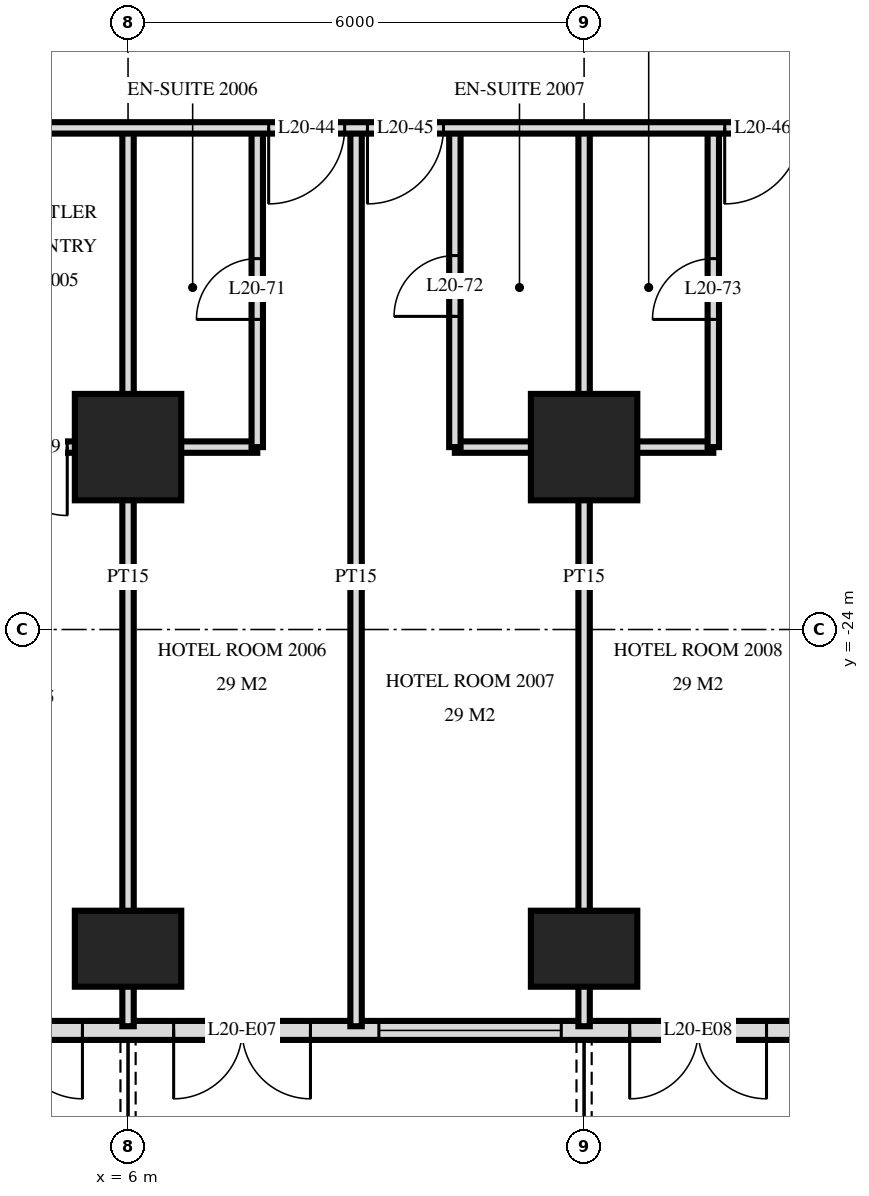
"""IFC4 building model, lengths in metres.
Left out: names, types, materials, properties, quantities, classifications, styles, units other than length and angle.
Written with IfcOpenShell. Run it as: python <this file> out.ifc"""

import sys

from ifc_helpers import new_model, si_unit, direction, frame, frame_2d, origin, origin_2d, place, context, subcontext, project, spatial, rectangle, extrude, element, fill, save


model = new_model("IFC4")
c1 = context("Model", 3, precision=1e-05, world=origin(), true_north=direction((0.0, 1.0)))
c2 = subcontext(c1, "Body", "Model", "MODEL_VIEW")
j1 = project(units=[si_unit("LENGTHUNIT", "METRE"), si_unit("PLANEANGLEUNIT", "RADIAN")], contexts=[c1])
p1 = place(None, origin())
s1 = spatial("IfcSite", under=j1, at=p1, CompositionType="ELEMENT")
p2 = place(p1, origin())
s2 = spatial("IfcBuilding", under=s1, at=p2, CompositionType="ELEMENT")
p3 = place(p2, frame((0.0, 0.0, 81.6)))
s3 = spatial("IfcBuildingStorey", under=s2, at=p3, CompositionType="ELEMENT", Elevation=81.6)
p4 = place(p3, frame((6.0, -28.2, 0.0), z_axis=(0.0, 0.0, 1.0), x_axis=(1.0, 0.0, 0.0)))
e1 = element("IfcColumn", 1, at=p4, inside=s3, PredefinedType="COLUMN", context=c2, shape_type="SweptSolid", body=[
    extrude(rectangle(XDim=1.4, YDim=1.0, at=origin_2d()), origin(), (0.0, 0.0, 1.0), 3.6),
])
p5 = place(p3, frame((6.0, -21.6, 0.0), z_axis=(0.0, 0.0, 1.0), x_axis=(1.0, 0.0, 0.0)))
e2 = element("IfcColumn", 2, at=p5, inside=s3, PredefinedType="COLUMN", context=c2, shape_type="SweptSolid", body=[
    extrude(rectangle(XDim=1.4, YDim=1.4, at=origin_2d()), origin(), (0.0, 0.0, 1.0), 3.6),
])
p6 = place(p3, frame((12.0, -28.2, 0.0), z_axis=(0.0, 0.0, 1.0), x_axis=(1.0, 0.0, 0.0)))
e3 = element("IfcColumn", 3, at=p6, inside=s3, PredefinedType="COLUMN", context=c2, shape_type="SweptSolid", body=[
    extrude(rectangle(XDim=1.4, YDim=1.0, at=origin_2d()), origin(), (0.0, 0.0, 1.0), 3.6),
])
p7 = place(p3, frame((12.0, -21.6, 0.0), z_axis=(0.0, 0.0, 1.0), x_axis=(1.0, 0.0, 0.0)))
e4 = element("IfcColumn", 4, at=p7, inside=s3, PredefinedType="COLUMN", context=c2, shape_type="SweptSolid", body=[
    extrude(rectangle(XDim=1.4, YDim=1.4, at=origin_2d()), origin(), (0.0, 0.0, 1.0), 3.6),
])
p8 = place(p3, frame((-28.775, -29.275, 0.0), z_axis=(0.0, 0.0, 1.0), x_axis=(1.0, 0.0, 0.0)))
e5 = element("IfcWall", 5, at=p8, inside=s3, PredefinedType="SOLIDWALL", context=c2, shape_type="SweptSolid", body=[
    extrude(rectangle(XDim=57.551, YDim=0.25, at=frame_2d((28.775, 0.0))), origin(), (0.0, 0.0, 1.0), 3.32),
])
p9 = place(p8, frame((0.575, 0.0, 0.0)))
e6 = element("IfcOpeningElement", 6, at=p9, cuts=e5, PredefinedType="OPENING", context=c2, shape_type="SweptSolid", body=[
    extrude(rectangle(XDim=1.8, YDim=2.4, at=frame_2d((0.9, 1.2))), frame((0.0, 0.135, 0.0), z_axis=(0.0, -1.0, 0.0), x_axis=(1.0, 0.0, 0.0)), (0.0, 0.0, 1.0), 0.27),
])
p10 = place(p8, frame((5.375, 0.0, 0.0)))
e7 = element("IfcOpeningElement", 7, at=p10, cuts=e5, PredefinedType="OPENING", context=c2, shape_type="SweptSolid", body=[
    extrude(rectangle(XDim=1.8, YDim=2.4, at=frame_2d((0.9, 1.2))), frame((0.0, 0.135, 0.0), z_axis=(0.0, -1.0, 0.0), x_axis=(1.0, 0.0, 0.0)), (0.0, 0.0, 1.0), 0.27),
])
p11 = place(p8, frame((8.075, 0.0, 0.3)))
e8 = element("IfcOpeningElement", 8, at=p11, cuts=e5, PredefinedType="OPENING", context=c2, shape_type="SweptSolid", body=[
    extrude(rectangle(XDim=2.4, YDim=2.1, at=frame_2d((1.2, 1.05))), frame((0.0, 0.135, 0.0), z_axis=(0.0, -1.0, 0.0), x_axis=(1.0, 0.0, 0.0)), (0.0, 0.0, 1.0), 0.27),
])
p12 = place(p8, frame((12.875, 0.0, 0.0)))
e9 = element("IfcOpeningElement", 9, at=p12, cuts=e5, PredefinedType="OPENING", context=c2, shape_type="SweptSolid", body=[
    extrude(rectangle(XDim=1.8, YDim=2.4, at=frame_2d((0.9, 1.2))), frame((0.0, 0.135, 0.0), z_axis=(0.0, -1.0, 0.0), x_axis=(1.0, 0.0, 0.0)), (0.0, 0.0, 1.0), 0.27),
])
p13 = place(p8, frame((17.375, 0.0, 0.0)))
e10 = element("IfcOpeningElement", 10, at=p13, cuts=e5, PredefinedType="OPENING", context=c2, shape_type="SweptSolid", body=[
    extrude(rectangle(XDim=1.8, YDim=2.4, at=frame_2d((0.9, 1.2))), frame((0.0, 0.135, 0.0), z_axis=(0.0, -1.0, 0.0), x_axis=(1.0, 0.0, 0.0)), (0.0, 0.0, 1.0), 0.27),
])
p14 = place(p8, frame((20.075, 0.0, 0.3)))
e11 = element("IfcOpeningElement", 11, at=p14, cuts=e5, PredefinedType="OPENING", context=c2, shape_type="SweptSolid", body=[
    extrude(rectangle(XDim=2.4, YDim=2.1, at=frame_2d((1.2, 1.05))), frame((0.0, 0.135, 0.0), z_axis=(0.0, -1.0, 0.0), x_axis=(1.0, 0.0, 0.0)), (0.0, 0.0, 1.0), 0.27),
])
p15 = place(p8, frame((23.075, 0.0, 0.3)))
e12 = element("IfcOpeningElement", 12, at=p15, cuts=e5, PredefinedType="OPENING", context=c2, shape_type="SweptSolid", body=[
    extrude(rectangle(XDim=2.4, YDim=2.1, at=frame_2d((1.2, 1.05))), frame((0.0, 0.135, 0.0), z_axis=(0.0, -1.0, 0.0), x_axis=(1.0, 0.0, 0.0)), (0.0, 0.0, 1.0), 0.27),
])
p16 = place(p8, frame((26.375, 0.0, 0.0)))
e13 = element("IfcOpeningElement", 13, at=p16, cuts=e5, PredefinedType="OPENING", context=c2, shape_type="SweptSolid", body=[
    extrude(rectangle(XDim=1.8, YDim=2.4, at=frame_2d((0.9, 1.2))), frame((0.0, 0.135, 0.0), z_axis=(0.0, -1.0, 0.0), x_axis=(1.0, 0.0, 0.0)), (0.0, 0.0, 1.0), 0.27),
])
p17 = place(p8, frame((29.075, 0.0, 0.3)))
e14 = element("IfcOpeningElement", 14, at=p17, cuts=e5, PredefinedType="OPENING", context=c2, shape_type="SweptSolid", body=[
    extrude(rectangle(XDim=2.4, YDim=2.1, at=frame_2d((1.2, 1.05))), frame((0.0, 0.135, 0.0), z_axis=(0.0, -1.0, 0.0), x_axis=(1.0, 0.0, 0.0)), (0.0, 0.0, 1.0), 0.27),
])
p18 = place(p8, frame((32.375, 0.0, 0.0)))
e15 = element("IfcOpeningElement", 15, at=p18, cuts=e5, PredefinedType="OPENING", context=c2, shape_type="SweptSolid", body=[
    extrude(rectangle(XDim=1.8, YDim=2.4, at=frame_2d((0.9, 1.2))), frame((0.0, 0.135, 0.0), z_axis=(0.0, -1.0, 0.0), x_axis=(1.0, 0.0, 0.0)), (0.0, 0.0, 1.0), 0.27),
])
p19 = place(p8, frame((35.375, 0.0, 0.0)))
e16 = element("IfcOpeningElement", 16, at=p19, cuts=e5, PredefinedType="OPENING", context=c2, shape_type="SweptSolid", body=[
    extrude(rectangle(XDim=1.8, YDim=2.4, at=frame_2d((0.9, 1.2))), frame((0.0, 0.135, 0.0), z_axis=(0.0, -1.0, 0.0), x_axis=(1.0, 0.0, 0.0)), (0.0, 0.0, 1.0), 0.27),
])
p20 = place(p8, frame((38.075, 0.0, 0.3)))
e17 = element("IfcOpeningElement", 17, at=p20, cuts=e5, PredefinedType="OPENING", context=c2, shape_type="SweptSolid", body=[
    extrude(rectangle(XDim=2.4, YDim=2.1, at=frame_2d((1.2, 1.05))), frame((0.0, 0.135, 0.0), z_axis=(0.0, -1.0, 0.0), x_axis=(1.0, 0.0, 0.0)), (0.0, 0.0, 1.0), 0.27),
])
p21 = place(p8, frame((41.375, 0.0, 0.0)))
e18 = element("IfcOpeningElement", 18, at=p21, cuts=e5, PredefinedType="OPENING", context=c2, shape_type="SweptSolid", body=[
    extrude(rectangle(XDim=1.8, YDim=2.4, at=frame_2d((0.9, 1.2))), frame((0.0, 0.135, 0.0), z_axis=(0.0, -1.0, 0.0), x_axis=(1.0, 0.0, 0.0)), (0.0, 0.0, 1.0), 0.27),
])
p22 = place(p8, frame((44.075, 0.0, 0.3)))
e19 = element("IfcOpeningElement", 19, at=p22, cuts=e5, PredefinedType="OPENING", context=c2, shape_type="SweptSolid", body=[
    extrude(rectangle(XDim=2.4, YDim=2.1, at=frame_2d((1.2, 1.05))), frame((0.0, 0.135, 0.0), z_axis=(0.0, -1.0, 0.0), x_axis=(1.0, 0.0, 0.0)), (0.0, 0.0, 1.0), 0.27),
])
p23 = place(p8, frame((47.075, 0.0, 0.3)))
e20 = element("IfcOpeningElement", 20, at=p23, cuts=e5, PredefinedType="OPENING", context=c2, shape_type="SweptSolid", body=[
    extrude(rectangle(XDim=2.4, YDim=2.1, at=frame_2d((1.2, 1.05))), frame((0.0, 0.135, 0.0), z_axis=(0.0, -1.0, 0.0), x_axis=(1.0, 0.0, 0.0)), (0.0, 0.0, 1.0), 0.27),
])
p24 = place(p8, frame((50.375, 0.0, 0.0)))
e21 = element("IfcOpeningElement", 21, at=p24, cuts=e5, PredefinedType="OPENING", context=c2, shape_type="SweptSolid", body=[
    extrude(rectangle(XDim=1.8, YDim=2.4, at=frame_2d((0.9, 1.2))), frame((0.0, 0.135, 0.0), z_axis=(0.0, -1.0, 0.0), x_axis=(1.0, 0.0, 0.0)), (0.0, 0.0, 1.0), 0.27),
])
p25 = place(p8, frame((53.375, 0.0, 0.0)))
e22 = element("IfcOpeningElement", 22, at=p25, cuts=e5, PredefinedType="OPENING", context=c2, shape_type="SweptSolid", body=[
    extrude(rectangle(XDim=1.8, YDim=2.4, at=frame_2d((0.9, 1.2))), frame((0.0, 0.135, 0.0), z_axis=(0.0, -1.0, 0.0), x_axis=(1.0, 0.0, 0.0)), (0.0, 0.0, 1.0), 0.27),
])
p26 = place(p3, frame((13.7, -21.6, 0.0), z_axis=(0.0, 0.0, 1.0), x_axis=(0.0, 1.0, 0.0)))
e23 = element("IfcWall", 23, at=p26, inside=s3, PredefinedType="PARTITIONING", context=c2, shape_type="SweptSolid", body=[
    extrude(rectangle(XDim=4.2, YDim=0.15, at=frame_2d((2.1, 0.0))), origin(), (0.0, 0.0, 1.0), 3.32),
])
p27 = place(p26, frame((1.68, 0.0, 0.0)))
e24 = element("IfcOpeningElement", 24, at=p27, cuts=e23, PredefinedType="OPENING", context=c2, shape_type="SweptSolid", body=[
    extrude(rectangle(XDim=0.8, YDim=2.1, at=frame_2d((0.4, 1.05))), frame((0.0, 0.085, 0.0), z_axis=(0.0, -1.0, 0.0), x_axis=(1.0, 0.0, 0.0)), (0.0, 0.0, 1.0), 0.17),
])
p28 = place(p3, frame((12.0, -29.22, 0.0), z_axis=(0.0, 0.0, 1.0), x_axis=(0.0, 1.0, 0.0)))
e25 = element("IfcWall", 25, at=p28, inside=s3, PredefinedType="PARTITIONING", context=c2, shape_type="SweptSolid", body=[
    extrude(rectangle(XDim=11.82, YDim=0.15, at=frame_2d((5.91, 0.0))), origin(), (0.0, 0.0, 1.0), 3.32),
])
p29 = place(p3, frame((10.3, -21.6, 0.0), z_axis=(0.0, 0.0, 1.0), x_axis=(0.0, 1.0, 0.0)))
e26 = element("IfcWall", 26, at=p29, inside=s3, PredefinedType="PARTITIONING", context=c2, shape_type="SweptSolid", body=[
    extrude(rectangle(XDim=4.2, YDim=0.15, at=frame_2d((2.1, 0.0))), origin(), (0.0, 0.0, 1.0), 3.32),
])
p30 = place(p29, frame((1.72, 0.0, 0.0)))
e27 = element("IfcOpeningElement", 27, at=p30, cuts=e26, PredefinedType="OPENING", context=c2, shape_type="SweptSolid", body=[
    extrude(rectangle(XDim=0.8, YDim=2.1, at=frame_2d((0.4, 1.05))), frame((0.0, 0.085, 0.0), z_axis=(0.0, -1.0, 0.0), x_axis=(1.0, 0.0, 0.0)), (0.0, 0.0, 1.0), 0.17),
])
p31 = place(p3, frame((9.0, -29.22, 0.0), z_axis=(0.0, 0.0, 1.0), x_axis=(0.0, 1.0, 0.0)))
e28 = element("IfcWall", 28, at=p31, inside=s3, PredefinedType="PARTITIONING", context=c2, shape_type="SweptSolid", body=[
    extrude(rectangle(XDim=11.82, YDim=0.15, at=frame_2d((5.91, 0.0))), origin(), (0.0, 0.0, 1.0), 3.32),
])
p32 = place(p3, frame((7.7, -21.6, 0.0), z_axis=(0.0, 0.0, 1.0), x_axis=(0.0, 1.0, 0.0)))
e29 = element("IfcWall", 29, at=p32, inside=s3, PredefinedType="PARTITIONING", context=c2, shape_type="SweptSolid", body=[
    extrude(rectangle(XDim=4.2, YDim=0.15, at=frame_2d((2.1, 0.0))), origin(), (0.0, 0.0, 1.0), 3.32),
])
p33 = place(p32, frame((1.68, 0.0, 0.0)))
e30 = element("IfcOpeningElement", 30, at=p33, cuts=e29, PredefinedType="OPENING", context=c2, shape_type="SweptSolid", body=[
    extrude(rectangle(XDim=0.8, YDim=2.1, at=frame_2d((0.4, 1.05))), frame((0.0, 0.085, 0.0), z_axis=(0.0, -1.0, 0.0), x_axis=(1.0, 0.0, 0.0)), (0.0, 0.0, 1.0), 0.17),
])
p34 = place(p3, frame((6.0, -29.22, 0.0), z_axis=(0.0, 0.0, 1.0), x_axis=(0.0, 1.0, 0.0)))
e31 = element("IfcWall", 31, at=p34, inside=s3, PredefinedType="PARTITIONING", context=c2, shape_type="SweptSolid", body=[
    extrude(rectangle(XDim=11.82, YDim=0.15, at=frame_2d((5.91, 0.0))), origin(), (0.0, 0.0, 1.0), 3.32),
])
p35 = place(p3, frame((4.2, -21.6, 0.0), z_axis=(0.0, 0.0, 1.0), x_axis=(1.0, 0.0, 0.0)))
e32 = element("IfcWall", 32, at=p35, inside=s3, PredefinedType="PARTITIONING", context=c2, shape_type="SweptSolid", body=[
    extrude(rectangle(XDim=3.5, YDim=0.15, at=frame_2d((1.75, 0.0))), origin(), (0.0, 0.0, 1.0), 3.32),
])
p36 = place(p35, frame((0.1, 0.0, 0.0)))
e33 = element("IfcOpeningElement", 33, at=p36, cuts=e32, PredefinedType="OPENING", context=c2, shape_type="SweptSolid", body=[
    extrude(rectangle(XDim=0.9, YDim=2.1, at=frame_2d((0.45, 1.05))), frame((0.0, 0.085, 0.0), z_axis=(0.0, -1.0, 0.0), x_axis=(1.0, 0.0, 0.0)), (0.0, 0.0, 1.0), 0.17),
])
p37 = place(p3, frame((10.3, -21.6, 0.0), z_axis=(0.0, 0.0, 1.0), x_axis=(1.0, 0.0, 0.0)))
e34 = element("IfcWall", 34, at=p37, inside=s3, PredefinedType="PARTITIONING", context=c2, shape_type="SweptSolid", body=[
    extrude(rectangle(XDim=3.4, YDim=0.15, at=frame_2d((1.7, 0.0))), origin(), (0.0, 0.0, 1.0), 3.32),
])
p38 = place(p3, frame((-33.12, -17.4, 0.0), z_axis=(0.0, 0.0, 1.0), x_axis=(1.0, 0.0, 0.0)))
e35 = element("IfcWall", 35, at=p38, inside=s3, PredefinedType="PARTITIONING", context=c2, shape_type="SweptSolid", body=[
    extrude(rectangle(XDim=66.24, YDim=0.15, at=frame_2d((33.12, 0.0))), origin(), (0.0, 0.0, 1.0), 3.32),
])
p39 = place(p38, frame((9.27, 0.0, 0.0)))
e36 = element("IfcOpeningElement", 36, at=p39, cuts=e35, PredefinedType="OPENING", context=c2, shape_type="SweptSolid", body=[
    extrude(rectangle(XDim=1.0, YDim=2.1, at=frame_2d((0.5, 1.05))), frame((0.0, 0.085, 0.0), z_axis=(0.0, -1.0, 0.0), x_axis=(1.0, 0.0, 0.0)), (0.0, 0.0, 1.0), 0.17),
])
p40 = place(p38, frame((13.97, 0.0, 0.0)))
e37 = element("IfcOpeningElement", 37, at=p40, cuts=e35, PredefinedType="OPENING", context=c2, shape_type="SweptSolid", body=[
    extrude(rectangle(XDim=1.0, YDim=2.1, at=frame_2d((0.5, 1.05))), frame((0.0, 0.085, 0.0), z_axis=(0.0, -1.0, 0.0), x_axis=(1.0, 0.0, 0.0)), (0.0, 0.0, 1.0), 0.17),
])
p41 = place(p38, frame((17.62, 0.0, 0.0)))
e38 = element("IfcOpeningElement", 38, at=p41, cuts=e35, PredefinedType="OPENING", context=c2, shape_type="SweptSolid", body=[
    extrude(rectangle(XDim=1.0, YDim=2.1, at=frame_2d((0.5, 1.05))), frame((0.0, 0.085, 0.0), z_axis=(0.0, -1.0, 0.0), x_axis=(1.0, 0.0, 0.0)), (0.0, 0.0, 1.0), 0.17),
])
p42 = place(p38, frame((21.27, 0.0, 0.0)))
e39 = element("IfcOpeningElement", 39, at=p42, cuts=e35, PredefinedType="OPENING", context=c2, shape_type="SweptSolid", body=[
    extrude(rectangle(XDim=1.0, YDim=2.1, at=frame_2d((0.5, 1.05))), frame((0.0, 0.085, 0.0), z_axis=(0.0, -1.0, 0.0), x_axis=(1.0, 0.0, 0.0)), (0.0, 0.0, 1.0), 0.17),
])
p43 = place(p38, frame((25.97, 0.0, 0.0)))
e40 = element("IfcOpeningElement", 40, at=p43, cuts=e35, PredefinedType="OPENING", context=c2, shape_type="SweptSolid", body=[
    extrude(rectangle(XDim=1.0, YDim=2.1, at=frame_2d((0.5, 1.05))), frame((0.0, 0.085, 0.0), z_axis=(0.0, -1.0, 0.0), x_axis=(1.0, 0.0, 0.0)), (0.0, 0.0, 1.0), 0.17),
])
p44 = place(p38, frame((35.62, 0.0, 0.0)))
e41 = element("IfcOpeningElement", 41, at=p44, cuts=e35, PredefinedType="OPENING", context=c2, shape_type="SweptSolid", body=[
    extrude(rectangle(XDim=1.0, YDim=2.1, at=frame_2d((0.5, 1.05))), frame((0.0, 0.085, 0.0), z_axis=(0.0, -1.0, 0.0), x_axis=(1.0, 0.0, 0.0)), (0.0, 0.0, 1.0), 0.17),
])
p45 = place(p38, frame((40.97, 0.0, 0.0)))
e42 = element("IfcOpeningElement", 42, at=p45, cuts=e35, PredefinedType="OPENING", context=c2, shape_type="SweptSolid", body=[
    extrude(rectangle(XDim=1.0, YDim=2.1, at=frame_2d((0.5, 1.05))), frame((0.0, 0.085, 0.0), z_axis=(0.0, -1.0, 0.0), x_axis=(1.0, 0.0, 0.0)), (0.0, 0.0, 1.0), 0.17),
])
p46 = place(p38, frame((42.27, 0.0, 0.0)))
e43 = element("IfcOpeningElement", 43, at=p46, cuts=e35, PredefinedType="OPENING", context=c2, shape_type="SweptSolid", body=[
    extrude(rectangle(XDim=1.0, YDim=2.1, at=frame_2d((0.5, 1.05))), frame((0.0, 0.085, 0.0), z_axis=(0.0, -1.0, 0.0), x_axis=(1.0, 0.0, 0.0)), (0.0, 0.0, 1.0), 0.17),
])
p47 = place(p38, frame((46.97, 0.0, 0.0)))
e44 = element("IfcOpeningElement", 44, at=p47, cuts=e35, PredefinedType="OPENING", context=c2, shape_type="SweptSolid", body=[
    extrude(rectangle(XDim=1.0, YDim=2.1, at=frame_2d((0.5, 1.05))), frame((0.0, 0.085, 0.0), z_axis=(0.0, -1.0, 0.0), x_axis=(1.0, 0.0, 0.0)), (0.0, 0.0, 1.0), 0.17),
])
p48 = place(p38, frame((48.27, 0.0, 0.0)))
e45 = element("IfcOpeningElement", 45, at=p48, cuts=e35, PredefinedType="OPENING", context=c2, shape_type="SweptSolid", body=[
    extrude(rectangle(XDim=1.0, YDim=2.1, at=frame_2d((0.5, 1.05))), frame((0.0, 0.085, 0.0), z_axis=(0.0, -1.0, 0.0), x_axis=(1.0, 0.0, 0.0)), (0.0, 0.0, 1.0), 0.17),
])
p49 = place(p38, frame((1.87, 0.0, 0.0)))
e46 = element("IfcOpeningElement", 46, at=p49, cuts=e35, PredefinedType="OPENING", context=c2, shape_type="SweptSolid", body=[
    extrude(rectangle(XDim=1.0, YDim=2.1, at=frame_2d((0.5, 1.05))), frame((0.0, 0.085, 0.0), z_axis=(0.0, -1.0, 0.0), x_axis=(1.0, 0.0, 0.0)), (0.0, 0.0, 1.0), 0.17),
])
p50 = place(p38, frame((60.37, 0.0, 0.0)))
e47 = element("IfcOpeningElement", 47, at=p50, cuts=e35, PredefinedType="OPENING", context=c2, shape_type="SweptSolid", body=[
    extrude(rectangle(XDim=1.0, YDim=2.1, at=frame_2d((0.5, 1.05))), frame((0.0, 0.085, 0.0), z_axis=(0.0, -1.0, 0.0), x_axis=(1.0, 0.0, 0.0)), (0.0, 0.0, 1.0), 0.17),
])
p51 = place(p18, frame((0.9, 0.0, 0.0), z_axis=(0.0, 0.0, 1.0), x_axis=(-1.0, 0.0, 0.0)))
e48 = element("IfcDoor", 48, at=p51, inside=s3, OperationType="DOUBLE_DOOR_SINGLE_SWING", PredefinedType="DOOR", context=c2, shape_type="SweptSolid", body=[
    extrude(rectangle(XDim=1.8, YDim=2.4, at=frame_2d((0.0, 1.2))), frame((0.0, -0.025, 0.0), z_axis=(0.0, 1.0, 0.0), x_axis=(-1.0, 0.0, 0.0)), (0.0, 0.0, 1.0), 0.05),
])
fill(e15, e48)
p52 = place(p19, frame((0.9, 0.0, 0.0), z_axis=(0.0, 0.0, 1.0), x_axis=(-1.0, 0.0, 0.0)))
e49 = element("IfcDoor", 49, at=p52, inside=s3, OperationType="DOUBLE_DOOR_SINGLE_SWING", PredefinedType="DOOR", context=c2, shape_type="SweptSolid", body=[
    extrude(rectangle(XDim=1.8, YDim=2.4, at=frame_2d((0.0, 1.2))), frame((0.0, -0.025, 0.0), z_axis=(0.0, 1.0, 0.0), x_axis=(-1.0, 0.0, 0.0)), (0.0, 0.0, 1.0), 0.05),
])
fill(e16, e49)
p53 = place(p20, origin())
e50 = element("IfcWindow", 50, at=p53, inside=s3, PartitioningType="SINGLE_PANEL", PredefinedType="WINDOW", context=c2, shape_type="SweptSolid", body=[
    extrude(rectangle(XDim=2.4, YDim=2.1, at=frame_2d((1.2, 1.05))), frame((0.0, 0.03, 0.0), z_axis=(0.0, -1.0, 0.0), x_axis=(1.0, 0.0, 0.0)), (0.0, 0.0, 1.0), 0.06),
])
fill(e17, e50)
p54 = place(p21, frame((0.9, 0.0, 0.0), z_axis=(0.0, 0.0, 1.0), x_axis=(-1.0, 0.0, 0.0)))
e51 = element("IfcDoor", 51, at=p54, inside=s3, OperationType="DOUBLE_DOOR_SINGLE_SWING", PredefinedType="DOOR", context=c2, shape_type="SweptSolid", body=[
    extrude(rectangle(XDim=1.8, YDim=2.4, at=frame_2d((0.0, 1.2))), frame((0.0, -0.025, 0.0), z_axis=(0.0, 1.0, 0.0), x_axis=(-1.0, 0.0, 0.0)), (0.0, 0.0, 1.0), 0.05),
])
fill(e18, e51)
p55 = place(p45, frame((0.5, 0.0, 0.0), z_axis=(0.0, 0.0, 1.0), x_axis=(-1.0, 0.0, 0.0)))
e52 = element("IfcDoor", 52, at=p55, inside=s3, OperationType="SINGLE_SWING_LEFT", PredefinedType="DOOR", context=c2, shape_type="SweptSolid", body=[
    extrude(rectangle(XDim=1.0, YDim=2.1, at=frame_2d((0.0, 1.05))), frame((0.0, -0.025, 0.0), z_axis=(0.0, 1.0, 0.0), x_axis=(-1.0, 0.0, 0.0)), (0.0, 0.0, 1.0), 0.05),
])
fill(e42, e52)
p56 = place(p46, frame((0.5, 0.0, 0.0), z_axis=(0.0, 0.0, 1.0), x_axis=(-1.0, 0.0, 0.0)))
e53 = element("IfcDoor", 53, at=p56, inside=s3, OperationType="SINGLE_SWING_LEFT", PredefinedType="DOOR", context=c2, shape_type="SweptSolid", body=[
    extrude(rectangle(XDim=1.0, YDim=2.1, at=frame_2d((0.0, 1.05))), frame((0.0, -0.025, 0.0), z_axis=(0.0, 1.0, 0.0), x_axis=(-1.0, 0.0, 0.0)), (0.0, 0.0, 1.0), 0.05),
])
fill(e43, e53)
p57 = place(p47, frame((0.5, 0.0, 0.0), z_axis=(0.0, 0.0, 1.0), x_axis=(-1.0, 0.0, 0.0)))
e54 = element("IfcDoor", 54, at=p57, inside=s3, OperationType="SINGLE_SWING_LEFT", PredefinedType="DOOR", context=c2, shape_type="SweptSolid", body=[
    extrude(rectangle(XDim=1.0, YDim=2.1, at=frame_2d((0.0, 1.05))), frame((0.0, -0.025, 0.0), z_axis=(0.0, 1.0, 0.0), x_axis=(-1.0, 0.0, 0.0)), (0.0, 0.0, 1.0), 0.05),
])
fill(e44, e54)
p58 = place(p36, frame((0.45, 0.0, 0.0), z_axis=(0.0, 0.0, 1.0), x_axis=(-1.0, 0.0, 0.0)))
e55 = element("IfcDoor", 55, at=p58, inside=s3, OperationType="SINGLE_SWING_RIGHT", PredefinedType="DOOR", context=c2, shape_type="SweptSolid", body=[
    extrude(rectangle(XDim=0.9, YDim=2.1, at=frame_2d((0.0, 1.05))), frame((0.0, -0.025, 0.0), z_axis=(0.0, 1.0, 0.0), x_axis=(-1.0, 0.0, 0.0)), (0.0, 0.0, 1.0), 0.05),
])
fill(e33, e55)
p59 = place(p33, origin())
e56 = element("IfcDoor", 56, at=p59, inside=s3, OperationType="SINGLE_SWING_RIGHT", PredefinedType="DOOR", context=c2, shape_type="SweptSolid", body=[
    extrude(rectangle(XDim=0.8, YDim=2.1, at=frame_2d((0.4, 1.05))), frame((0.0, 0.025, 0.0), z_axis=(0.0, -1.0, 0.0), x_axis=(1.0, 0.0, 0.0)), (0.0, 0.0, 1.0), 0.05),
])
fill(e30, e56)
p60 = place(p30, origin())
e57 = element("IfcDoor", 57, at=p60, inside=s3, OperationType="SINGLE_SWING_RIGHT", PredefinedType="DOOR", context=c2, shape_type="SweptSolid", body=[
    extrude(rectangle(XDim=0.8, YDim=2.1, at=frame_2d((0.4, 1.05))), frame((0.0, 0.025, 0.0), z_axis=(0.0, -1.0, 0.0), x_axis=(1.0, 0.0, 0.0)), (0.0, 0.0, 1.0), 0.05),
])
fill(e27, e57)
p61 = place(p27, origin())
e58 = element("IfcDoor", 58, at=p61, inside=s3, OperationType="SINGLE_SWING_RIGHT", PredefinedType="DOOR", context=c2, shape_type="SweptSolid", body=[
    extrude(rectangle(XDim=0.8, YDim=2.1, at=frame_2d((0.4, 1.05))), frame((0.0, 0.025, 0.0), z_axis=(0.0, -1.0, 0.0), x_axis=(1.0, 0.0, 0.0)), (0.0, 0.0, 1.0), 0.05),
])
fill(e24, e58)
save(model, sys.argv[1])
